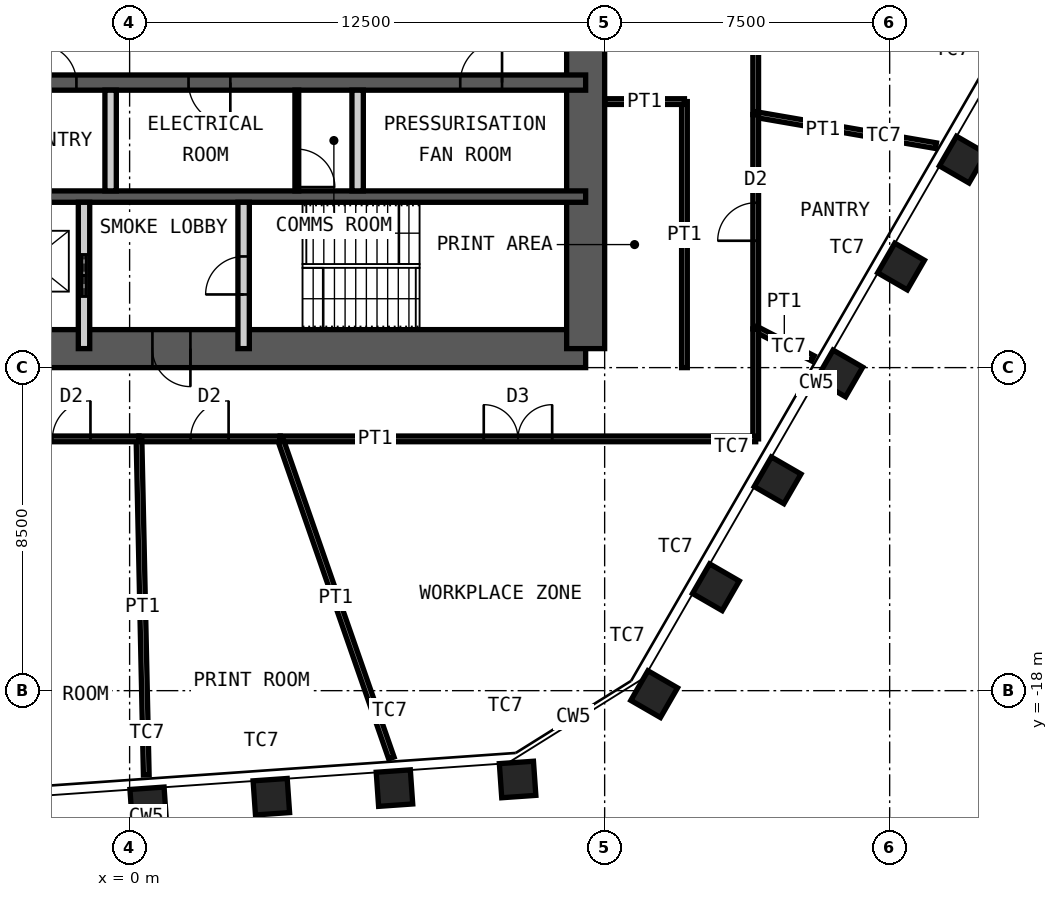
"""IFC4 building model, lengths in metres.
Left out: names, types, materials, properties, quantities, classifications, styles, units other than length and angle.
Written with IfcOpenShell. Run it as: python <this file> out.ifc"""

import sys

from ifc_helpers import new_model, si_unit, direction, frame, frame_2d, origin, origin_2d, place, context, subcontext, project, spatial, rectangle, hollow_rectangle, extrude, element, fill, save


model = new_model("IFC4")
c1 = context("Model", 3, precision=1e-05, world=origin(), true_north=direction((0.0, 1.0)))
c2 = subcontext(c1, "Body", "Model", "MODEL_VIEW")
j1 = project(units=[si_unit("LENGTHUNIT", "METRE"), si_unit("PLANEANGLEUNIT", "RADIAN")], contexts=[c1])
p1 = place(None, origin())
s1 = spatial("IfcSite", under=j1, at=p1, CompositionType="ELEMENT")
p2 = place(p1, origin())
s2 = spatial("IfcBuilding", under=s1, at=p2, CompositionType="ELEMENT")
p3 = place(p2, frame((0.0, 0.0, 270.4)))
s3 = spatial("IfcBuildingStorey", under=s2, at=p3, CompositionType="ELEMENT", Elevation=270.4)
for number, where, z_axis, x_axis in (
    (1, (21.924, -4.027, 0.0), (0.0, 0.0, 1.0), (0.5, 0.866, 0.0)),
    (2, (20.3, -6.84, 0.0), (0.0, 0.0, 1.0), (0.5, 0.866, 0.0)),
    (3, (18.676, -9.653, 0.0), (0.0, 0.0, 1.0), (0.5, 0.866, 0.0)),
    (4, (17.052, -12.466, 0.0), (0.0, 0.0, 1.0), (0.5, 0.866, 0.0)),
    (5, (15.427, -15.279, 0.0), (0.0, 0.0, 1.0), (0.5, 0.866, 0.0)),
    (6, (13.803, -18.092, 0.0), (0.0, 0.0, 1.0), (0.5, 0.866, 0.0)),
    (7, (10.209, -20.337, 0.0), (0.0, 0.0, 1.0), (0.998, 0.07, 0.0)),
    (8, (6.969, -20.564, 0.0), (0.0, 0.0, 1.0), (0.998, 0.07, 0.0)),
    (9, (3.729, -20.791, 0.0), (0.0, 0.0, 1.0), (0.998, 0.07, 0.0)),
    (10, (0.489, -21.017, 0.0), (0.0, 0.0, 1.0), (0.998, 0.07, 0.0)),
):
    element("IfcColumn", number, at=place(p3, frame(where, z_axis=z_axis, x_axis=x_axis)), inside=s3, PredefinedType="COLUMN", context=c2, shape_type="SweptSolid", body=[
        extrude(hollow_rectangle(XDim=0.9, YDim=0.9, WallThickness=0.06, at=origin_2d()), origin(), (0.0, 0.0, 1.0), 4.2),
    ])
p4 = place(p3, frame((-12.0, -9.0, 0.0), z_axis=(0.0, 0.0, 1.0), x_axis=(1.0, 0.0, 0.0)))
e11 = element("IfcWall", 11, at=p4, inside=s3, PredefinedType="SHEAR", context=c2, shape_type="SweptSolid", body=[
    extrude(rectangle(XDim=24.0, YDim=1.0, at=frame_2d((12.0, 0.0))), origin(), (0.0, 0.0, 1.0), 4.2),
])
p5 = place(p4, frame((1.35, 0.0, 0.0)))
e12 = element("IfcOpeningElement", 12, at=p5, cuts=e11, PredefinedType="OPENING", context=c2, shape_type="SweptSolid", body=[
    extrude(rectangle(XDim=1.0, YDim=2.1, at=frame_2d((0.5, 1.05))), frame((0.0, 0.51, 0.0), z_axis=(0.0, -1.0, 0.0), x_axis=(1.0, 0.0, 0.0)), (0.0, 0.0, 1.0), 1.02),
])
p6 = place(p4, frame((5.325, 0.0, 0.0)))
e13 = element("IfcOpeningElement", 13, at=p6, cuts=e11, PredefinedType="OPENING", context=c2, shape_type="SweptSolid", body=[
    extrude(rectangle(XDim=1.15, YDim=2.1, at=frame_2d((0.575, 1.05))), frame((0.0, 0.51, 0.0), z_axis=(0.0, -1.0, 0.0), x_axis=(1.0, 0.0, 0.0)), (0.0, 0.0, 1.0), 1.02),
])
p7 = place(p4, frame((12.6, 0.0, 0.0)))
e14 = element("IfcOpeningElement", 14, at=p7, cuts=e11, PredefinedType="OPENING", context=c2, shape_type="SweptSolid", body=[
    extrude(rectangle(XDim=1.0, YDim=2.1, at=frame_2d((0.5, 1.05))), frame((0.0, 0.51, 0.0), z_axis=(0.0, -1.0, 0.0), x_axis=(1.0, 0.0, 0.0)), (0.0, 0.0, 1.0), 1.02),
])
p8 = place(p3, frame((12.0, -9.0, 0.0), z_axis=(0.0, 0.0, 1.0), x_axis=(0.0, 1.0, 0.0)))
e15 = element("IfcWall", 15, at=p8, inside=s3, PredefinedType="SHEAR", context=c2, shape_type="SweptSolid", body=[
    extrude(rectangle(XDim=18.0, YDim=1.0, at=frame_2d((9.0, 0.0))), origin(), (0.0, 0.0, 1.0), 4.2),
])
p9 = place(p8, frame((8.1, 0.0, 0.0)))
e16 = element("IfcOpeningElement", 16, at=p9, cuts=e15, PredefinedType="OPENING", context=c2, shape_type="SweptSolid", body=[
    extrude(rectangle(XDim=1.8, YDim=2.1, at=frame_2d((0.9, 1.05))), frame((0.0, 0.51, 0.0), z_axis=(0.0, -1.0, 0.0), x_axis=(1.0, 0.0, 0.0)), (0.0, 0.0, 1.0), 1.02),
])
p10 = place(p3, frame((-12.0, -2.0, 0.0), z_axis=(0.0, 0.0, 1.0), x_axis=(1.0, 0.0, 0.0)))
e17 = element("IfcWall", 17, at=p10, inside=s3, PredefinedType="SHEAR", context=c2, shape_type="SweptSolid", body=[
    extrude(rectangle(XDim=24.0, YDim=0.4, at=frame_2d((12.0, 0.0))), origin(), (0.0, 0.0, 1.0), 4.2),
])
p11 = place(p10, frame((1.1, 0.0, 0.0)))
e18 = element("IfcOpeningElement", 18, at=p11, cuts=e17, PredefinedType="OPENING", context=c2, shape_type="SweptSolid", body=[
    extrude(rectangle(XDim=1.1, YDim=2.1, at=frame_2d((0.55, 1.05))), frame((0.0, 0.21, 0.0), z_axis=(0.0, -1.0, 0.0), x_axis=(1.0, 0.0, 0.0)), (0.0, 0.0, 1.0), 0.42),
])
p12 = place(p10, frame((13.55, 0.0, 0.0)))
e19 = element("IfcOpeningElement", 19, at=p12, cuts=e17, PredefinedType="OPENING", context=c2, shape_type="SweptSolid", body=[
    extrude(rectangle(XDim=1.1, YDim=2.1, at=frame_2d((0.55, 1.05))), frame((0.0, 0.21, 0.0), z_axis=(0.0, -1.0, 0.0), x_axis=(1.0, 0.0, 0.0)), (0.0, 0.0, 1.0), 0.42),
])
p13 = place(p10, frame((20.7, 0.0, 0.0)))
e20 = element("IfcOpeningElement", 20, at=p13, cuts=e17, PredefinedType="OPENING", context=c2, shape_type="SweptSolid", body=[
    extrude(rectangle(XDim=1.1, YDim=2.1, at=frame_2d((0.55, 1.05))), frame((0.0, 0.21, 0.0), z_axis=(0.0, -1.0, 0.0), x_axis=(1.0, 0.0, 0.0)), (0.0, 0.0, 1.0), 0.42),
])
p14 = place(p10, frame((4.0, 0.0, 0.0)))
e21 = element("IfcOpeningElement", 21, at=p14, cuts=e17, PredefinedType="OPENING", context=c2, shape_type="SweptSolid", body=[
    extrude(rectangle(XDim=1.0, YDim=2.1, at=frame_2d((0.5, 1.05))), frame((0.0, 0.21, 0.0), z_axis=(0.0, -1.0, 0.0), x_axis=(1.0, 0.0, 0.0)), (0.0, 0.0, 1.0), 0.42),
])
p15 = place(p10, frame((6.8, 0.0, 0.0)))
e22 = element("IfcOpeningElement", 22, at=p15, cuts=e17, PredefinedType="OPENING", context=c2, shape_type="SweptSolid", body=[
    extrude(rectangle(XDim=1.0, YDim=2.1, at=frame_2d((0.5, 1.05))), frame((0.0, 0.21, 0.0), z_axis=(0.0, -1.0, 0.0), x_axis=(1.0, 0.0, 0.0)), (0.0, 0.0, 1.0), 0.42),
])
p16 = place(p10, frame((9.6, 0.0, 0.0)))
e23 = element("IfcOpeningElement", 23, at=p16, cuts=e17, PredefinedType="OPENING", context=c2, shape_type="SweptSolid", body=[
    extrude(rectangle(XDim=1.0, YDim=2.1, at=frame_2d((0.5, 1.05))), frame((0.0, 0.21, 0.0), z_axis=(0.0, -1.0, 0.0), x_axis=(1.0, 0.0, 0.0)), (0.0, 0.0, 1.0), 0.42),
])
p17 = place(p3, frame((-12.0, -5.0, 0.0), z_axis=(0.0, 0.0, 1.0), x_axis=(1.0, 0.0, 0.0)))
e24 = element("IfcWall", 24, at=p17, inside=s3, PredefinedType="SHEAR", context=c2, shape_type="SweptSolid", body=[
    extrude(rectangle(XDim=24.0, YDim=0.3, at=frame_2d((12.0, 0.0))), origin(), (0.0, 0.0, 1.0), 4.2),
])
for number, where, z_axis, x_axis in (
    (25, (-0.5, -4.85, 0.0), (0.0, 0.0, 1.0), (0.0, 1.0, 0.0)),
    (26, (6.0, -4.85, 0.0), (0.0, 0.0, 1.0), (0.0, 1.0, 0.0)),
):
    element("IfcWall", number, at=place(p3, frame(where, z_axis=z_axis, x_axis=x_axis)), inside=s3, PredefinedType="PARTITIONING", context=c2, shape_type="SweptSolid", body=[
        extrude(rectangle(XDim=2.65, YDim=0.3, at=frame_2d((1.325, 0.0))), origin(), (0.0, 0.0, 1.0), 3.98),
    ])
p18 = place(p3, frame((-1.2, -9.0, 0.0), z_axis=(0.0, 0.0, 1.0), x_axis=(0.0, 1.0, 0.0)))
e27 = element("IfcWall", 27, at=p18, inside=s3, PredefinedType="PARTITIONING", context=c2, shape_type="SweptSolid", body=[
    extrude(rectangle(XDim=3.85, YDim=0.3, at=frame_2d((1.925, 0.0))), origin(), (0.0, 0.0, 1.0), 3.98),
])
p19 = place(p18, frame((1.375, 0.0, 0.0)))
e28 = element("IfcOpeningElement", 28, at=p19, cuts=e27, PredefinedType="OPENING", context=c2, shape_type="SweptSolid", body=[
    extrude(rectangle(XDim=1.1, YDim=2.4, at=frame_2d((0.55, 1.2))), frame((0.0, 0.16, 0.0), z_axis=(0.0, -1.0, 0.0), x_axis=(1.0, 0.0, 0.0)), (0.0, 0.0, 1.0), 0.32),
])
p20 = place(p3, frame((3.0, -9.0, 0.0), z_axis=(0.0, 0.0, 1.0), x_axis=(0.0, 1.0, 0.0)))
e29 = element("IfcWall", 29, at=p20, inside=s3, PredefinedType="PARTITIONING", context=c2, shape_type="SweptSolid", body=[
    extrude(rectangle(XDim=3.85, YDim=0.3, at=frame_2d((1.925, 0.0))), origin(), (0.0, 0.0, 1.0), 3.98),
])
p21 = place(p20, frame((1.425, 0.0, 0.0)))
e30 = element("IfcOpeningElement", 30, at=p21, cuts=e29, PredefinedType="OPENING", context=c2, shape_type="SweptSolid", body=[
    extrude(rectangle(XDim=1.0, YDim=2.1, at=frame_2d((0.5, 1.05))), frame((0.0, 0.16, 0.0), z_axis=(0.0, -1.0, 0.0), x_axis=(1.0, 0.0, 0.0)), (0.0, 0.0, 1.0), 0.32),
])
p22 = place(p3, frame((4.4, -4.85, 0.0), z_axis=(0.0, 0.0, 1.0), x_axis=(0.0, 1.0, 0.0)))
e31 = element("IfcWall", 31, at=p22, inside=s3, PredefinedType="PARTITIONING", context=c2, shape_type="SweptSolid", body=[
    extrude(rectangle(XDim=2.65, YDim=0.1, at=frame_2d((1.325, 0.0))), origin(), (0.0, 0.0, 1.0), 3.98),
])
p23 = place(p22, frame((0.1, 0.0, 0.0)))
e32 = element("IfcOpeningElement", 32, at=p23, cuts=e31, PredefinedType="OPENING", context=c2, shape_type="SweptSolid", body=[
    extrude(rectangle(XDim=1.0, YDim=2.4, at=frame_2d((0.5, 1.2))), frame((0.0, 0.06, 0.0), z_axis=(0.0, -1.0, 0.0), x_axis=(1.0, 0.0, 0.0)), (0.0, 0.0, 1.0), 0.12),
])
p24 = place(p3, frame((16.475, 6.737, 0.0), z_axis=(0.0, 0.0, 1.0), x_axis=(0.0, -1.0, 0.0)))
e33 = element("IfcWall", 33, at=p24, inside=s3, PredefinedType="PARTITIONING", context=c2, shape_type="SweptSolid", body=[
    extrude(rectangle(XDim=9.578, YDim=0.15, at=frame_2d((4.789, 0.0))), origin(), (0.0, 0.0, 1.0), 4.03),
])
p25 = place(p24, frame((3.889, 0.0, 0.0)))
e34 = element("IfcOpeningElement", 34, at=p25, cuts=e33, PredefinedType="OPENING", context=c2, shape_type="SweptSolid", body=[
    extrude(rectangle(XDim=1.8, YDim=2.4, at=frame_2d((0.9, 1.2))), frame((0.0, 0.085, 0.0), z_axis=(0.0, -1.0, 0.0), x_axis=(1.0, 0.0, 0.0)), (0.0, 0.0, 1.0), 0.17),
])
p26 = place(p3, frame((21.219, -3.66, 0.0), z_axis=(0.0, 0.0, 1.0), x_axis=(-0.985444592587, 0.16999692627, 0.0)))
e35 = element("IfcWall", 35, at=p26, inside=s3, PredefinedType="PARTITIONING", context=c2, shape_type="SweptSolid", body=[
    extrude(rectangle(XDim=4.814, YDim=0.15, at=frame_2d((2.407, 0.0))), origin(), (0.0, 0.0, 1.0), 4.03),
])
p27 = place(p3, frame((16.475, -2.842, 0.0), z_axis=(0.0, 0.0, 1.0), x_axis=(0.0, -1.0, 0.0)))
e36 = element("IfcWall", 36, at=p27, inside=s3, PredefinedType="PARTITIONING", context=c2, shape_type="SweptSolid", body=[
    extrude(rectangle(XDim=5.64, YDim=0.15, at=frame_2d((2.82, 0.0))), origin(), (0.0, 0.0, 1.0), 4.03),
])
p28 = place(p27, frame((2.32, 0.0, 0.0)))
e37 = element("IfcOpeningElement", 37, at=p28, cuts=e36, PredefinedType="OPENING", context=c2, shape_type="SweptSolid", body=[
    extrude(rectangle(XDim=1.0, YDim=2.4, at=frame_2d((0.5, 1.2))), frame((0.0, 0.085, 0.0), z_axis=(0.0, -1.0, 0.0), x_axis=(1.0, 0.0, 0.0)), (0.0, 0.0, 1.0), 0.17),
])
p29 = place(p3, frame((17.98, -9.257, 0.0), z_axis=(0.0, 0.0, 1.0), x_axis=(-0.889058145064, 0.457794292991, 0.0)))
e38 = element("IfcWall", 38, at=p29, inside=s3, PredefinedType="PARTITIONING", context=c2, shape_type="SweptSolid", body=[
    extrude(rectangle(XDim=1.693, YDim=0.15, at=frame_2d((0.847, 0.0))), origin(), (0.0, 0.0, 1.0), 3.33),
])
p30 = place(p3, frame((16.475, -8.482, 0.0), z_axis=(0.0, 0.0, 1.0), x_axis=(0.0, -1.0, 0.0)))
e39 = element("IfcWall", 39, at=p30, inside=s3, PredefinedType="PARTITIONING", context=c2, shape_type="SweptSolid", body=[
    extrude(rectangle(XDim=2.893, YDim=0.15, at=frame_2d((1.447, 0.0))), origin(), (0.0, 0.0, 1.0), 4.03),
])
p31 = place(p3, frame((16.475, -11.375, 0.0), z_axis=(0.0, 0.0, 1.0), x_axis=(-1.0, 0.0, 0.0)))
e40 = element("IfcWall", 40, at=p31, inside=s3, PredefinedType="PARTITIONING", context=c2, shape_type="SweptSolid", body=[
    extrude(rectangle(XDim=12.512, YDim=0.15, at=frame_2d((6.256, 0.0))), origin(), (0.0, 0.0, 1.0), 4.03),
])
p32 = place(p31, frame((5.356, 0.0, 0.0)))
e41 = element("IfcOpeningElement", 41, at=p32, cuts=e40, PredefinedType="OPENING", context=c2, shape_type="SweptSolid", body=[
    extrude(rectangle(XDim=1.8, YDim=2.4, at=frame_2d((0.9, 1.2))), frame((0.0, 0.085, 0.0), z_axis=(0.0, -1.0, 0.0), x_axis=(1.0, 0.0, 0.0)), (0.0, 0.0, 1.0), 0.17),
])
p33 = place(p3, frame((6.888, -19.771, 0.0), z_axis=(0.0, 0.0, 1.0), x_axis=(-0.328983865825, 0.944335542075, 0.0)))
e42 = element("IfcWall", 42, at=p33, inside=s3, PredefinedType="PARTITIONING", context=c2, shape_type="SweptSolid", body=[
    extrude(rectangle(XDim=8.891, YDim=0.15, at=frame_2d((4.446, 0.0))), origin(), (0.0, 0.0, 1.0), 3.33),
])
p34 = place(p3, frame((3.963, -11.375, 0.0), z_axis=(0.0, 0.0, 1.0), x_axis=(-1.0, 0.0, 0.0)))
e43 = element("IfcWall", 43, at=p34, inside=s3, PredefinedType="PARTITIONING", context=c2, shape_type="SweptSolid", body=[
    extrude(rectangle(XDim=3.716, YDim=0.15, at=frame_2d((1.858, 0.0))), origin(), (0.0, 0.0, 1.0), 4.03),
])
p35 = place(p34, frame((1.358, 0.0, 0.0)))
e44 = element("IfcOpeningElement", 44, at=p35, cuts=e43, PredefinedType="OPENING", context=c2, shape_type="SweptSolid", body=[
    extrude(rectangle(XDim=1.0, YDim=2.4, at=frame_2d((0.5, 1.2))), frame((0.0, 0.085, 0.0), z_axis=(0.0, -1.0, 0.0), x_axis=(1.0, 0.0, 0.0)), (0.0, 0.0, 1.0), 0.17),
])
p36 = place(p3, frame((0.438, -20.219, 0.0), z_axis=(0.0, 0.0, 1.0), x_axis=(-0.021638042243, 0.999765870156, 0.0)))
e45 = element("IfcWall", 45, at=p36, inside=s3, PredefinedType="PARTITIONING", context=c2, shape_type="SweptSolid", body=[
    extrude(rectangle(XDim=8.846, YDim=0.15, at=frame_2d((4.423, 0.0))), origin(), (0.0, 0.0, 1.0), 3.33),
])
p37 = place(p3, frame((0.247, -11.375, 0.0), z_axis=(0.0, 0.0, 1.0), x_axis=(-1.0, 0.0, 0.0)))
e46 = element("IfcWall", 46, at=p37, inside=s3, PredefinedType="PARTITIONING", context=c2, shape_type="SweptSolid", body=[
    extrude(rectangle(XDim=3.554, YDim=0.15, at=frame_2d((1.777, 0.0))), origin(), (0.0, 0.0, 1.0), 4.03),
])
p38 = place(p37, frame((1.277, 0.0, 0.0)))
e47 = element("IfcOpeningElement", 47, at=p38, cuts=e46, PredefinedType="OPENING", context=c2, shape_type="SweptSolid", body=[
    extrude(rectangle(XDim=1.0, YDim=2.4, at=frame_2d((0.5, 1.2))), frame((0.0, 0.085, 0.0), z_axis=(0.0, -1.0, 0.0), x_axis=(1.0, 0.0, 0.0)), (0.0, 0.0, 1.0), 0.17),
])
p39 = place(p3, frame((14.6, -9.5, 0.0), z_axis=(0.0, 0.0, 1.0), x_axis=(0.0, 1.0, 0.0)))
e48 = element("IfcWall", 48, at=p39, inside=s3, PredefinedType="PARTITIONING", context=c2, shape_type="SweptSolid", body=[
    extrude(rectangle(XDim=7.0, YDim=0.15, at=frame_2d((3.5, 0.0))), origin(), (0.0, 0.0, 1.0), 4.03),
])
p40 = place(p3, frame((12.5, -2.5, 0.0), z_axis=(0.0, 0.0, 1.0), x_axis=(1.0, 0.0, 0.0)))
e49 = element("IfcWall", 49, at=p40, inside=s3, PredefinedType="PARTITIONING", context=c2, shape_type="SweptSolid", body=[
    extrude(rectangle(XDim=2.1, YDim=0.15, at=frame_2d((1.05, 0.0))), origin(), (0.0, 0.0, 1.0), 3.33),
])
p41 = place(p7, origin())
e50 = element("IfcDoor", 50, at=p41, inside=s3, OperationType="SINGLE_SWING_RIGHT", PredefinedType="DOOR", context=c2, shape_type="SweptSolid", body=[
    extrude(rectangle(XDim=1.0, YDim=2.1, at=frame_2d((0.5, 1.05))), frame((0.0, 0.025, 0.0), z_axis=(0.0, -1.0, 0.0), x_axis=(1.0, 0.0, 0.0)), (0.0, 0.0, 1.0), 0.05),
])
fill(e14, e50)
p42 = place(p21, origin())
e51 = element("IfcDoor", 51, at=p42, inside=s3, OperationType="SINGLE_SWING_RIGHT", PredefinedType="DOOR", context=c2, shape_type="SweptSolid", body=[
    extrude(rectangle(XDim=1.0, YDim=2.1, at=frame_2d((0.5, 1.05))), frame((0.0, 0.025, 0.0), z_axis=(0.0, -1.0, 0.0), x_axis=(1.0, 0.0, 0.0)), (0.0, 0.0, 1.0), 0.05),
])
fill(e30, e51)
p43 = place(p12, origin())
e52 = element("IfcDoor", 52, at=p43, inside=s3, OperationType="SINGLE_SWING_RIGHT", PredefinedType="DOOR", context=c2, shape_type="SweptSolid", body=[
    extrude(rectangle(XDim=1.1, YDim=2.1, at=frame_2d((0.55, 1.05))), frame((0.0, 0.025, 0.0), z_axis=(0.0, -1.0, 0.0), x_axis=(1.0, 0.0, 0.0)), (0.0, 0.0, 1.0), 0.05),
])
fill(e19, e52)
p44 = place(p13, origin())
e53 = element("IfcDoor", 53, at=p44, inside=s3, OperationType="SINGLE_SWING_LEFT", PredefinedType="DOOR", context=c2, shape_type="SweptSolid", body=[
    extrude(rectangle(XDim=1.1, YDim=2.1, at=frame_2d((0.55, 1.05))), frame((0.0, 0.025, 0.0), z_axis=(0.0, -1.0, 0.0), x_axis=(1.0, 0.0, 0.0)), (0.0, 0.0, 1.0), 0.05),
])
fill(e20, e53)
p45 = place(p19, origin())
e54 = element("IfcDoor", 54, at=p45, inside=s3, OperationType="DOUBLE_DOOR_SLIDING", PredefinedType="DOOR", context=c2, shape_type="SweptSolid", body=[
    extrude(rectangle(XDim=1.1, YDim=2.4, at=frame_2d((0.55, 1.2))), frame((0.0, 0.025, 0.0), z_axis=(0.0, -1.0, 0.0), x_axis=(1.0, 0.0, 0.0)), (0.0, 0.0, 1.0), 0.05),
])
fill(e28, e54)
p46 = place(p16, origin())
e55 = element("IfcDoor", 55, at=p46, inside=s3, OperationType="SINGLE_SWING_RIGHT", PredefinedType="DOOR", context=c2, shape_type="SweptSolid", body=[
    extrude(rectangle(XDim=1.0, YDim=2.1, at=frame_2d((0.5, 1.05))), frame((0.0, 0.025, 0.0), z_axis=(0.0, -1.0, 0.0), x_axis=(1.0, 0.0, 0.0)), (0.0, 0.0, 1.0), 0.05),
])
fill(e23, e55)
p47 = place(p23, origin())
e56 = element("IfcDoor", 56, at=p47, inside=s3, OperationType="SINGLE_SWING_LEFT", PredefinedType="DOOR", context=c2, shape_type="SweptSolid", body=[
    extrude(rectangle(XDim=1.0, YDim=2.4, at=frame_2d((0.5, 1.2))), frame((0.0, 0.025, 0.0), z_axis=(0.0, -1.0, 0.0), x_axis=(1.0, 0.0, 0.0)), (0.0, 0.0, 1.0), 0.05),
])
fill(e32, e56)
p48 = place(p28, origin())
e57 = element("IfcDoor", 57, at=p48, inside=s3, OperationType="SINGLE_SWING_RIGHT", PredefinedType="DOOR", context=c2, shape_type="SweptSolid", body=[
    extrude(rectangle(XDim=1.0, YDim=2.4, at=frame_2d((0.5, 1.2))), frame((0.0, 0.025, 0.0), z_axis=(0.0, -1.0, 0.0), x_axis=(1.0, 0.0, 0.0)), (0.0, 0.0, 1.0), 0.05),
])
fill(e37, e57)
p49 = place(p32, origin())
e58 = element("IfcDoor", 58, at=p49, inside=s3, OperationType="DOUBLE_DOOR_DOUBLE_SWING", PredefinedType="DOOR", context=c2, shape_type="SweptSolid", body=[
    extrude(rectangle(XDim=1.8, YDim=2.4, at=frame_2d((0.9, 1.2))), frame((0.0, 0.025, 0.0), z_axis=(0.0, -1.0, 0.0), x_axis=(1.0, 0.0, 0.0)), (0.0, 0.0, 1.0), 0.05),
])
fill(e41, e58)
p50 = place(p35, origin())
e59 = element("IfcDoor", 59, at=p50, inside=s3, OperationType="SINGLE_SWING_LEFT", PredefinedType="DOOR", context=c2, shape_type="SweptSolid", body=[
    extrude(rectangle(XDim=1.0, YDim=2.4, at=frame_2d((0.5, 1.2))), frame((0.0, 0.025, 0.0), z_axis=(0.0, -1.0, 0.0), x_axis=(1.0, 0.0, 0.0)), (0.0, 0.0, 1.0), 0.05),
])
fill(e44, e59)
p51 = place(p38, origin())
e60 = element("IfcDoor", 60, at=p51, inside=s3, OperationType="SINGLE_SWING_LEFT", PredefinedType="DOOR", context=c2, shape_type="SweptSolid", body=[
    extrude(rectangle(XDim=1.0, YDim=2.4, at=frame_2d((0.5, 1.2))), frame((0.0, 0.025, 0.0), z_axis=(0.0, -1.0, 0.0), x_axis=(1.0, 0.0, 0.0)), (0.0, 0.0, 1.0), 0.05),
])
fill(e47, e60)
save(model, sys.argv[1])
